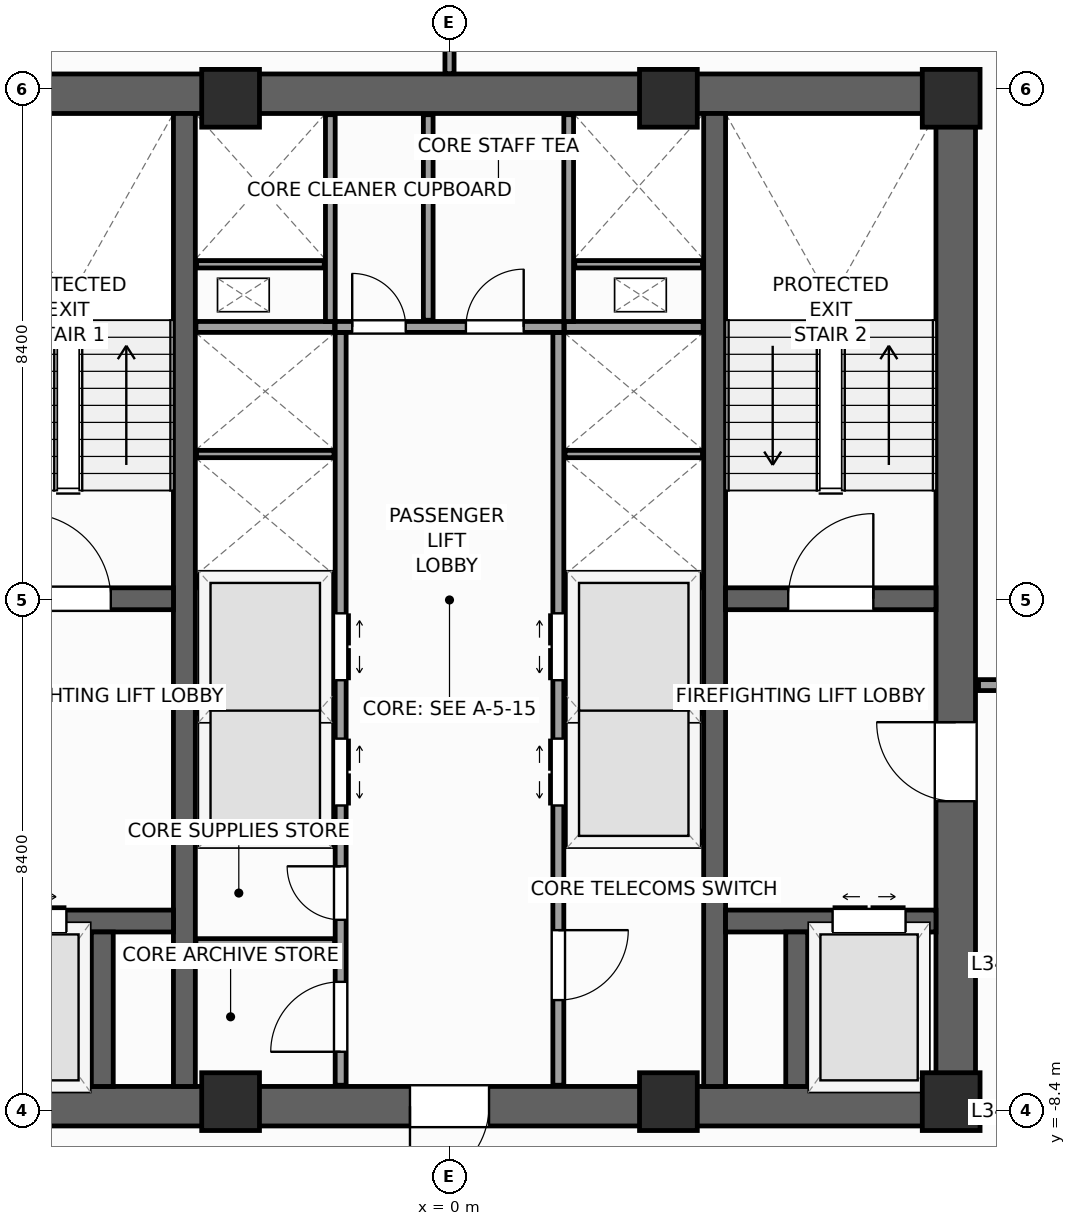
"""IFC4 building model, lengths in metres.
Left out: names, types, materials, properties, quantities, classifications, styles, units other than length and angle.
Written with IfcOpenShell. Run it as: python <this file> out.ifc"""

import sys

from ifc_helpers import new_model, si_unit, direction, frame, frame_2d, origin, origin_2d, place, context, subcontext, project, spatial, rectangle, extrude, source, transform, mapped, element, fill, save


model = new_model("IFC4")
c1 = context("Model", 3, precision=1e-05, world=origin(), true_north=direction((0.0, 1.0)))
c2 = subcontext(c1, "Body", "Model", "MODEL_VIEW")
j1 = project(units=[si_unit("LENGTHUNIT", "METRE"), si_unit("PLANEANGLEUNIT", "RADIAN")], contexts=[c1])
p1 = place(None, origin())
s1 = spatial("IfcSite", under=j1, at=p1, CompositionType="ELEMENT")
p2 = place(p1, origin())
s2 = spatial("IfcBuilding", under=s1, at=p2, CompositionType="ELEMENT")
p3 = place(p2, frame((0.0, 0.0, 144.4)))
s3 = spatial("IfcBuildingStorey", under=s2, at=p3, CompositionType="ELEMENT", Elevation=144.4)
p4 = place(p3, frame((-8.65, -8.325, 0.0), z_axis=(0.0, 0.0, 1.0), x_axis=(1.0, 0.0, 0.0)))
e1 = element("IfcWall", 1, at=p4, inside=s3, PredefinedType="SHEAR", context=c2, shape_type="SweptSolid", body=[
    extrude(rectangle(XDim=17.3, YDim=0.65, at=frame_2d((8.65, 0.0))), origin(), (0.0, 0.0, 1.0), 4.0),
])
p5 = place(p4, frame((8.0, 0.0, 0.0)))
e2 = element("IfcOpeningElement", 2, at=p5, cuts=e1, PredefinedType="OPENING", context=c2, shape_type="SweptSolid", body=[
    extrude(rectangle(XDim=1.3, YDim=2.2, at=frame_2d((0.65, 1.1))), frame((0.0, 0.335, 0.0), z_axis=(0.0, -1.0, 0.0), x_axis=(1.0, 0.0, 0.0)), (0.0, 0.0, 1.0), 0.67),
])
p6 = place(p3, frame((-8.65, 8.325, 0.0), z_axis=(0.0, 0.0, 1.0), x_axis=(1.0, 0.0, 0.0)))
e3 = element("IfcWall", 3, at=p6, inside=s3, PredefinedType="SHEAR", context=c2, shape_type="SweptSolid", body=[
    extrude(rectangle(XDim=17.3, YDim=0.65, at=frame_2d((8.65, 0.0))), origin(), (0.0, 0.0, 1.0), 4.0),
])
p7 = place(p3, frame((8.325, -8.0, 0.0), z_axis=(0.0, 0.0, 1.0), x_axis=(0.0, 1.0, 0.0)))
e4 = element("IfcWall", 4, at=p7, inside=s3, PredefinedType="SHEAR", context=c2, shape_type="SweptSolid", body=[
    extrude(rectangle(XDim=16.0, YDim=0.65, at=frame_2d((8.0, 0.0))), origin(), (0.0, 0.0, 1.0), 4.0),
])
p8 = place(p7, frame((4.69, 0.0, 0.0)))
e5 = element("IfcOpeningElement", 5, at=p8, cuts=e4, PredefinedType="OPENING", context=c2, shape_type="SweptSolid", body=[
    extrude(rectangle(XDim=1.3, YDim=2.2, at=frame_2d((0.65, 1.1))), frame((0.0, 0.335, 0.0), z_axis=(0.0, -1.0, 0.0), x_axis=(1.0, 0.0, 0.0)), (0.0, 0.0, 1.0), 0.67),
])
for number, where, z_axis, x_axis in (
    (6, (-4.36, -8.0, 0.0), (0.0, 0.0, 1.0), (0.0, 1.0, 0.0)),
    (7, (4.36, -8.0, 0.0), (0.0, 0.0, 1.0), (0.0, 1.0, 0.0)),
):
    element("IfcWall", number, at=place(p3, frame(where, z_axis=z_axis, x_axis=x_axis)), inside=s3, PredefinedType="SHEAR", context=c2, shape_type="SweptSolid", body=[
        extrude(rectangle(XDim=16.0, YDim=0.36, at=frame_2d((8.0, 0.0))), origin(), (0.0, 0.0, 1.0), 4.0),
    ])
p9 = place(p3, frame((-8.0, 0.02, 0.0), z_axis=(0.0, 0.0, 1.0), x_axis=(1.0, 0.0, 0.0)))
e8 = element("IfcWall", 8, at=p9, inside=s3, PredefinedType="SHEAR", context=c2, shape_type="SweptSolid", body=[
    extrude(rectangle(XDim=3.46, YDim=0.36, at=frame_2d((1.73, 0.0))), origin(), (0.0, 0.0, 1.0), 4.0),
])
p10 = place(p9, frame((1.03, 0.0, 0.0)))
e9 = element("IfcOpeningElement", 9, at=p10, cuts=e8, PredefinedType="OPENING", context=c2, shape_type="SweptSolid", body=[
    extrude(rectangle(XDim=1.4, YDim=2.2, at=frame_2d((0.7, 1.1))), frame((0.0, 0.19, 0.0), z_axis=(0.0, -1.0, 0.0), x_axis=(1.0, 0.0, 0.0)), (0.0, 0.0, 1.0), 0.38),
])
p11 = place(p3, frame((4.54, 0.02, 0.0), z_axis=(0.0, 0.0, 1.0), x_axis=(1.0, 0.0, 0.0)))
e10 = element("IfcWall", 10, at=p11, inside=s3, PredefinedType="SHEAR", context=c2, shape_type="SweptSolid", body=[
    extrude(rectangle(XDim=3.46, YDim=0.36, at=frame_2d((1.73, 0.0))), origin(), (0.0, 0.0, 1.0), 4.0),
])
p12 = place(p11, frame((1.03, 0.0, 0.0)))
e11 = element("IfcOpeningElement", 11, at=p12, cuts=e10, PredefinedType="OPENING", context=c2, shape_type="SweptSolid", body=[
    extrude(rectangle(XDim=1.4, YDim=2.2, at=frame_2d((0.7, 1.1))), frame((0.0, 0.19, 0.0), z_axis=(0.0, -1.0, 0.0), x_axis=(1.0, 0.0, 0.0)), (0.0, 0.0, 1.0), 0.38),
])
p13 = place(p3, frame((-8.0, -5.28, 0.0), z_axis=(0.0, 0.0, 1.0), x_axis=(1.0, 0.0, 0.0)))
e12 = element("IfcWall", 12, at=p13, inside=s3, PredefinedType="SHEAR", context=c2, shape_type="SweptSolid", body=[
    extrude(rectangle(XDim=3.46, YDim=0.36, at=frame_2d((1.73, 0.0))), origin(), (0.0, 0.0, 1.0), 4.0),
])
p14 = place(p13, frame((0.5, 0.0, 0.0)))
e13 = element("IfcOpeningElement", 13, at=p14, cuts=e12, PredefinedType="OPENING", context=c2, shape_type="SweptSolid", body=[
    extrude(rectangle(XDim=1.2, YDim=2.25, at=frame_2d((0.6, 1.125))), frame((0.0, 0.19, 0.0), z_axis=(0.0, -1.0, 0.0), x_axis=(1.0, 0.0, 0.0)), (0.0, 0.0, 1.0), 0.38),
])
p15 = place(p3, frame((4.54, -5.28, 0.0), z_axis=(0.0, 0.0, 1.0), x_axis=(1.0, 0.0, 0.0)))
e14 = element("IfcWall", 14, at=p15, inside=s3, PredefinedType="SHEAR", context=c2, shape_type="SweptSolid", body=[
    extrude(rectangle(XDim=3.46, YDim=0.36, at=frame_2d((1.73, 0.0))), origin(), (0.0, 0.0, 1.0), 4.0),
])
p16 = place(p15, frame((1.76, 0.0, 0.0)))
e15 = element("IfcOpeningElement", 15, at=p16, cuts=e14, PredefinedType="OPENING", context=c2, shape_type="SweptSolid", body=[
    extrude(rectangle(XDim=1.2, YDim=2.25, at=frame_2d((0.6, 1.125))), frame((0.0, 0.19, 0.0), z_axis=(0.0, -1.0, 0.0), x_axis=(1.0, 0.0, 0.0)), (0.0, 0.0, 1.0), 0.38),
])
for number, where, z_axis, x_axis in (
    (16, (-5.71, -8.0, 0.0), (0.0, 0.0, 1.0), (0.0, 1.0, 0.0)),
    (17, (5.71, -8.0, 0.0), (0.0, 0.0, 1.0), (0.0, 1.0, 0.0)),
):
    element("IfcWall", number, at=place(p3, frame(where, z_axis=z_axis, x_axis=x_axis)), inside=s3, PredefinedType="SHEAR", context=c2, shape_type="SweptSolid", body=[
        extrude(rectangle(XDim=2.54, YDim=0.36, at=frame_2d((1.27, 0.0))), origin(), (0.0, 0.0, 1.0), 4.0),
    ])
m1 = source(origin(), c2, "Body", "SweptSolid", [
    extrude(rectangle(XDim=0.95, YDim=0.95, at=origin_2d()), origin(), (0.0, 0.0, 1.0), 4.0),
])
for number, where, z_axis, x_axis in (
    (18, (8.25, -8.25, 0.0), (0.0, 0.0, 1.0), (1.0, 0.0, 0.0)),
    (19, (8.25, 8.25, 0.0), (0.0, 0.0, 1.0), (1.0, 0.0, 0.0)),
    (20, (-3.6, -8.25, 0.0), (0.0, 0.0, 1.0), (1.0, 0.0, 0.0)),
    (21, (3.6, -8.25, 0.0), (0.0, 0.0, 1.0), (1.0, 0.0, 0.0)),
    (22, (-3.6, 8.25, 0.0), (0.0, 0.0, 1.0), (1.0, 0.0, 0.0)),
    (23, (3.6, 8.25, 0.0), (0.0, 0.0, 1.0), (1.0, 0.0, 0.0)),
):
    element("IfcColumn", number, at=place(p3, frame(where, z_axis=z_axis, x_axis=x_axis)), inside=s3, PredefinedType="PILASTER", context=c2, shape_type="MappedRepresentation", body=[
        mapped(m1, transform((0.0, 0.0, 0.0), scale=1.0)),
    ])
p17 = place(p3, frame((-1.79, -7.98, 0.0), z_axis=(0.0, 0.0, 1.0), x_axis=(0.0, 1.0, 0.0)))
e24 = element("IfcWall", 24, at=p17, inside=s3, PredefinedType="PARTITIONING", context=c2, shape_type="SweptSolid", body=[
    extrude(rectangle(XDim=12.38, YDim=0.18, at=frame_2d((6.19, 0.0))), origin(), (0.0, 0.0, 1.0), 3.74),
])
p18 = place(p17, frame((4.6, 0.0, 0.0)))
e25 = element("IfcOpeningElement", 25, at=p18, cuts=e24, PredefinedType="OPENING", context=c2, shape_type="SweptSolid", body=[
    extrude(rectangle(XDim=1.1, YDim=2.2, at=frame_2d((0.55, 1.1))), frame((0.0, 0.1, 0.0), z_axis=(0.0, -1.0, 0.0), x_axis=(1.0, 0.0, 0.0)), (0.0, 0.0, 1.0), 0.2),
])
p19 = place(p17, frame((6.66, 0.0, 0.0)))
e26 = element("IfcOpeningElement", 26, at=p19, cuts=e24, PredefinedType="OPENING", context=c2, shape_type="SweptSolid", body=[
    extrude(rectangle(XDim=1.1, YDim=2.2, at=frame_2d((0.55, 1.1))), frame((0.0, 0.1, 0.0), z_axis=(0.0, -1.0, 0.0), x_axis=(1.0, 0.0, 0.0)), (0.0, 0.0, 1.0), 0.2),
])
p20 = place(p17, frame((0.55, 0.0, 0.0)))
e27 = element("IfcOpeningElement", 27, at=p20, cuts=e24, PredefinedType="OPENING", context=c2, shape_type="SweptSolid", body=[
    extrude(rectangle(XDim=1.15, YDim=2.25, at=frame_2d((0.575, 1.125))), frame((0.0, 0.1, 0.0), z_axis=(0.0, -1.0, 0.0), x_axis=(1.0, 0.0, 0.0)), (0.0, 0.0, 1.0), 0.2),
])
p21 = place(p17, frame((2.72, 0.0, 0.0)))
e28 = element("IfcOpeningElement", 28, at=p21, cuts=e24, PredefinedType="OPENING", context=c2, shape_type="SweptSolid", body=[
    extrude(rectangle(XDim=0.88, YDim=2.1, at=frame_2d((0.44, 1.05))), frame((0.0, 0.1, 0.0), z_axis=(0.0, -1.0, 0.0), x_axis=(1.0, 0.0, 0.0)), (0.0, 0.0, 1.0), 0.2),
])
p22 = place(p3, frame((1.79, -7.98, 0.0), z_axis=(0.0, 0.0, 1.0), x_axis=(0.0, 1.0, 0.0)))
e29 = element("IfcWall", 29, at=p22, inside=s3, PredefinedType="PARTITIONING", context=c2, shape_type="SweptSolid", body=[
    extrude(rectangle(XDim=12.38, YDim=0.18, at=frame_2d((6.19, 0.0))), origin(), (0.0, 0.0, 1.0), 3.74),
])
p23 = place(p22, frame((4.6, 0.0, 0.0)))
e30 = element("IfcOpeningElement", 30, at=p23, cuts=e29, PredefinedType="OPENING", context=c2, shape_type="SweptSolid", body=[
    extrude(rectangle(XDim=1.1, YDim=2.2, at=frame_2d((0.55, 1.1))), frame((0.0, 0.1, 0.0), z_axis=(0.0, -1.0, 0.0), x_axis=(1.0, 0.0, 0.0)), (0.0, 0.0, 1.0), 0.2),
])
p24 = place(p22, frame((6.66, 0.0, 0.0)))
e31 = element("IfcOpeningElement", 31, at=p24, cuts=e29, PredefinedType="OPENING", context=c2, shape_type="SweptSolid", body=[
    extrude(rectangle(XDim=1.1, YDim=2.2, at=frame_2d((0.55, 1.1))), frame((0.0, 0.1, 0.0), z_axis=(0.0, -1.0, 0.0), x_axis=(1.0, 0.0, 0.0)), (0.0, 0.0, 1.0), 0.2),
])
p25 = place(p22, frame((1.4, 0.0, 0.0)))
e32 = element("IfcOpeningElement", 32, at=p25, cuts=e29, PredefinedType="OPENING", context=c2, shape_type="SweptSolid", body=[
    extrude(rectangle(XDim=1.15, YDim=2.25, at=frame_2d((0.575, 1.125))), frame((0.0, 0.1, 0.0), z_axis=(0.0, -1.0, 0.0), x_axis=(1.0, 0.0, 0.0)), (0.0, 0.0, 1.0), 0.2),
])
p26 = place(p3, frame((-1.88, 4.49, 0.0), z_axis=(0.0, 0.0, 1.0), x_axis=(1.0, 0.0, 0.0)))
e33 = element("IfcWall", 33, at=p26, inside=s3, PredefinedType="PARTITIONING", context=c2, shape_type="SweptSolid", body=[
    extrude(rectangle(XDim=3.76, YDim=0.18, at=frame_2d((1.88, 0.0))), origin(), (0.0, 0.0, 1.0), 3.74),
])
p27 = place(p26, frame((0.28, 0.0, 0.0)))
e34 = element("IfcOpeningElement", 34, at=p27, cuts=e33, PredefinedType="OPENING", context=c2, shape_type="SweptSolid", body=[
    extrude(rectangle(XDim=0.88, YDim=2.1, at=frame_2d((0.44, 1.05))), frame((0.0, 0.1, 0.0), z_axis=(0.0, -1.0, 0.0), x_axis=(1.0, 0.0, 0.0)), (0.0, 0.0, 1.0), 0.2),
])
p28 = place(p26, frame((2.15, 0.0, 0.0)))
e35 = element("IfcOpeningElement", 35, at=p28, cuts=e33, PredefinedType="OPENING", context=c2, shape_type="SweptSolid", body=[
    extrude(rectangle(XDim=0.95, YDim=2.1, at=frame_2d((0.475, 1.05))), frame((0.0, 0.1, 0.0), z_axis=(0.0, -1.0, 0.0), x_axis=(1.0, 0.0, 0.0)), (0.0, 0.0, 1.0), 0.2),
])
for number, where, z_axis, x_axis in (
    (36, (-4.17, -3.9, 0.0), (0.0, 0.0, 1.0), (1.0, 0.0, 0.0)),
    (37, (1.89, -3.9, 0.0), (0.0, 0.0, 1.0), (1.0, 0.0, 0.0)),
    (38, (-4.17, 0.3, 0.0), (0.0, 0.0, 1.0), (1.0, 0.0, 0.0)),
    (39, (1.89, 0.3, 0.0), (0.0, 0.0, 1.0), (1.0, 0.0, 0.0)),
    (40, (-4.17, 4.49, 0.0), (0.0, 0.0, 1.0), (1.0, 0.0, 0.0)),
    (41, (1.89, 4.49, 0.0), (0.0, 0.0, 1.0), (1.0, 0.0, 0.0)),
):
    element("IfcWall", number, at=place(p3, frame(where, z_axis=z_axis, x_axis=x_axis)), inside=s3, PredefinedType="PARTITIONING", context=c2, shape_type="SweptSolid", body=[
        extrude(rectangle(XDim=2.28, YDim=0.18, at=frame_2d((1.14, 0.0))), origin(), (0.0, 0.0, 1.0), 3.74),
    ])
for number, where, z_axis, x_axis in (
    (42, (-4.16, -1.8, 0.0), (0.0, 0.0, 1.0), (1.0, 0.0, 0.0)),
    (43, (1.9, -1.8, 0.0), (0.0, 0.0, 1.0), (1.0, 0.0, 0.0)),
    (44, (-4.16, 2.4, 0.0), (0.0, 0.0, 1.0), (1.0, 0.0, 0.0)),
    (45, (1.9, 2.4, 0.0), (0.0, 0.0, 1.0), (1.0, 0.0, 0.0)),
):
    element("IfcWall", number, at=place(p3, frame(where, z_axis=z_axis, x_axis=x_axis)), inside=s3, PredefinedType="PARTITIONING", context=c2, shape_type="SweptSolid", body=[
        extrude(rectangle(XDim=2.26, YDim=0.12, at=frame_2d((1.13, 0.0))), origin(), (0.0, 0.0, 1.0), 3.74),
    ])
p29 = place(p3, frame((-4.17, -5.65, 0.0), z_axis=(0.0, 0.0, 1.0), x_axis=(1.0, 0.0, 0.0)))
e46 = element("IfcWall", 46, at=p29, inside=s3, PredefinedType="PARTITIONING", context=c2, shape_type="SweptSolid", body=[
    extrude(rectangle(XDim=2.28, YDim=0.16, at=frame_2d((1.14, 0.0))), origin(), (0.0, 0.0, 1.0), 3.74),
])
for number, where, z_axis, x_axis in (
    (47, (-1.96, 4.58, 0.0), (0.0, 0.0, 1.0), (0.0, 1.0, 0.0)),
    (48, (1.96, 4.58, 0.0), (0.0, 0.0, 1.0), (0.0, 1.0, 0.0)),
):
    element("IfcWall", number, at=place(p3, frame(where, z_axis=z_axis, x_axis=x_axis)), inside=s3, PredefinedType="PARTITIONING", context=c2, shape_type="SweptSolid", body=[
        extrude(rectangle(XDim=3.4, YDim=0.16, at=frame_2d((1.7, 0.0))), origin(), (0.0, 0.0, 1.0), 3.74),
    ])
for number, where, z_axis, x_axis in (
    (49, (-4.16, 5.52, 0.0), (0.0, 0.0, 1.0), (1.0, 0.0, 0.0)),
    (50, (2.06, 5.52, 0.0), (0.0, 0.0, 1.0), (1.0, 0.0, 0.0)),
):
    element("IfcWall", number, at=place(p3, frame(where, z_axis=z_axis, x_axis=x_axis)), inside=s3, PredefinedType="PARTITIONING", context=c2, shape_type="SweptSolid", body=[
        extrude(rectangle(XDim=2.1, YDim=0.12, at=frame_2d((1.05, 0.0))), origin(), (0.0, 0.0, 1.0), 3.74),
    ])
p30 = place(p3, frame((-0.35, 4.6, 0.0), z_axis=(0.0, 0.0, 1.0), x_axis=(0.0, 1.0, 0.0)))
e51 = element("IfcWall", 51, at=p30, inside=s3, PredefinedType="PARTITIONING", context=c2, shape_type="SweptSolid", body=[
    extrude(rectangle(XDim=3.38, YDim=0.16, at=frame_2d((1.69, 0.0))), origin(), (0.0, 0.0, 1.0), 3.74),
])
p31 = place(p3, frame((8.7, -1.4, 0.0), z_axis=(0.0, 0.0, 1.0), x_axis=(1.0, 0.0, 0.0)))
e52 = element("IfcWall", 52, at=p31, inside=s3, PredefinedType="PARTITIONING", context=c2, shape_type="SweptSolid", body=[
    extrude(rectangle(XDim=1.75, YDim=0.18, at=frame_2d((0.875, 0.0))), origin(), (0.0, 0.0, 1.0), 3.74),
])
p32 = place(p31, frame((0.325, 0.0, 0.0)))
e53 = element("IfcOpeningElement", 53, at=p32, cuts=e52, PredefinedType="OPENING", context=c2, shape_type="SweptSolid", body=[
    extrude(rectangle(XDim=1.1, YDim=2.2, at=frame_2d((0.55, 1.1))), frame((0.0, 0.1, 0.0), z_axis=(0.0, -1.0, 0.0), x_axis=(1.0, 0.0, 0.0)), (0.0, 0.0, 1.0), 0.2),
])
p33 = place(p3, frame((0.0, 8.655, 0.0), z_axis=(0.0, 0.0, 1.0), x_axis=(0.0, 1.0, 0.0)))
e54 = element("IfcWall", 54, at=p33, inside=s3, PredefinedType="PARTITIONING", context=c2, shape_type="SweptSolid", body=[
    extrude(rectangle(XDim=21.772, YDim=0.15, at=frame_2d((10.886, 0.0))), origin(), (0.0, 0.0, 1.0), 3.74),
])
m2 = source(origin(), c2, "Body", "SweptSolid", [
    extrude(rectangle(XDim=1.4, YDim=2.2, at=frame_2d((0.7, 1.1))), frame((0.0, 0.025, 0.0), z_axis=(0.0, -1.0, 0.0), x_axis=(1.0, 0.0, 0.0)), (0.0, 0.0, 1.0), 0.05),
])
p34 = place(p10, origin())
e55 = element("IfcDoor", 55, at=p34, inside=s3, OperationType="SINGLE_SWING_LEFT", PredefinedType="DOOR", context=c2, shape_type="MappedRepresentation", body=[
    mapped(m2, transform((0.0, 0.0, 0.0), scale=1.0)),
])
fill(e9, e55)
p35 = place(p12, origin())
e56 = element("IfcDoor", 56, at=p35, inside=s3, OperationType="SINGLE_SWING_RIGHT", PredefinedType="DOOR", context=c2, shape_type="MappedRepresentation", body=[
    mapped(m2, transform((0.0, 0.0, 0.0), scale=1.0)),
])
fill(e11, e56)
m3 = source(origin(), c2, "Body", "SweptSolid", [
    extrude(rectangle(XDim=1.3, YDim=2.2, at=frame_2d((0.65, 1.1))), frame((0.0, 0.025, 0.0), z_axis=(0.0, -1.0, 0.0), x_axis=(1.0, 0.0, 0.0)), (0.0, 0.0, 1.0), 0.05),
])
p36 = place(p8, origin())
e57 = element("IfcDoor", 57, at=p36, inside=s3, OperationType="SINGLE_SWING_RIGHT", PredefinedType="DOOR", context=c2, shape_type="MappedRepresentation", body=[
    mapped(m3, transform((0.0, 0.0, 0.0), scale=1.0)),
])
fill(e5, e57)
p37 = place(p5, frame((1.3, 0.0, 0.0), z_axis=(0.0, 0.0, 1.0), x_axis=(-1.0, 0.0, 0.0)))
e58 = element("IfcDoor", 58, at=p37, inside=s3, OperationType="SINGLE_SWING_LEFT", PredefinedType="DOOR", context=c2, shape_type="MappedRepresentation", body=[
    mapped(m3, transform((0.0, 0.0, 0.0), scale=1.0)),
])
fill(e2, e58)
m4 = source(origin(), c2, "Body", "SweptSolid", [
    extrude(rectangle(XDim=1.2, YDim=2.25, at=frame_2d((0.6, 1.125))), frame((0.0, 0.025, 0.0), z_axis=(0.0, -1.0, 0.0), x_axis=(1.0, 0.0, 0.0)), (0.0, 0.0, 1.0), 0.05),
])
p38 = place(p14, origin())
e59 = element("IfcDoor", 59, at=p38, inside=s3, OperationType="DOUBLE_DOOR_SLIDING", PredefinedType="DOOR", context=c2, shape_type="MappedRepresentation", body=[
    mapped(m4, transform((0.0, 0.0, 0.0), scale=1.0)),
])
fill(e13, e59)
p39 = place(p16, origin())
e60 = element("IfcDoor", 60, at=p39, inside=s3, OperationType="DOUBLE_DOOR_SLIDING", PredefinedType="DOOR", context=c2, shape_type="MappedRepresentation", body=[
    mapped(m4, transform((0.0, 0.0, 0.0), scale=1.0)),
])
fill(e15, e60)
m5 = source(origin(), c2, "Body", "SweptSolid", [
    extrude(rectangle(XDim=1.1, YDim=2.2, at=frame_2d((0.55, 1.1))), frame((0.0, 0.025, 0.0), z_axis=(0.0, -1.0, 0.0), x_axis=(1.0, 0.0, 0.0)), (0.0, 0.0, 1.0), 0.05),
])
p40 = place(p18, frame((1.1, 0.0, 0.0), z_axis=(0.0, 0.0, 1.0), x_axis=(-1.0, 0.0, 0.0)))
e61 = element("IfcDoor", 61, at=p40, inside=s3, OperationType="DOUBLE_DOOR_SLIDING", PredefinedType="DOOR", context=c2, shape_type="MappedRepresentation", body=[
    mapped(m5, transform((0.0, 0.0, 0.0), scale=1.0)),
])
fill(e25, e61)
p41 = place(p19, frame((1.1, 0.0, 0.0), z_axis=(0.0, 0.0, 1.0), x_axis=(-1.0, 0.0, 0.0)))
e62 = element("IfcDoor", 62, at=p41, inside=s3, OperationType="DOUBLE_DOOR_SLIDING", PredefinedType="DOOR", context=c2, shape_type="MappedRepresentation", body=[
    mapped(m5, transform((0.0, 0.0, 0.0), scale=1.0)),
])
fill(e26, e62)
p42 = place(p23, origin())
e63 = element("IfcDoor", 63, at=p42, inside=s3, OperationType="DOUBLE_DOOR_SLIDING", PredefinedType="DOOR", context=c2, shape_type="MappedRepresentation", body=[
    mapped(m5, transform((0.0, 0.0, 0.0), scale=1.0)),
])
fill(e30, e63)
p43 = place(p24, origin())
e64 = element("IfcDoor", 64, at=p43, inside=s3, OperationType="DOUBLE_DOOR_SLIDING", PredefinedType="DOOR", context=c2, shape_type="MappedRepresentation", body=[
    mapped(m5, transform((0.0, 0.0, 0.0), scale=1.0)),
])
fill(e31, e64)
m6 = source(origin(), c2, "Body", "SweptSolid", [
    extrude(rectangle(XDim=1.15, YDim=2.25, at=frame_2d((0.575, 1.125))), frame((0.0, 0.025, 0.0), z_axis=(0.0, -1.0, 0.0), x_axis=(1.0, 0.0, 0.0)), (0.0, 0.0, 1.0), 0.05),
])
p44 = place(p20, origin())
e65 = element("IfcDoor", 65, at=p44, inside=s3, OperationType="SINGLE_SWING_LEFT", PredefinedType="DOOR", context=c2, shape_type="MappedRepresentation", body=[
    mapped(m6, transform((0.0, 0.0, 0.0), scale=1.0)),
])
fill(e27, e65)
m7 = source(origin(), c2, "Body", "SweptSolid", [
    extrude(rectangle(XDim=0.88, YDim=2.1, at=frame_2d((0.44, 1.05))), frame((0.0, 0.025, 0.0), z_axis=(0.0, -1.0, 0.0), x_axis=(1.0, 0.0, 0.0)), (0.0, 0.0, 1.0), 0.05),
])
p45 = place(p21, origin())
e66 = element("IfcDoor", 66, at=p45, inside=s3, OperationType="SINGLE_SWING_RIGHT", PredefinedType="DOOR", context=c2, shape_type="MappedRepresentation", body=[
    mapped(m7, transform((0.0, 0.0, 0.0), scale=1.0)),
])
fill(e28, e66)
p46 = place(p25, frame((1.15, 0.0, 0.0), z_axis=(0.0, 0.0, 1.0), x_axis=(-1.0, 0.0, 0.0)))
e67 = element("IfcDoor", 67, at=p46, inside=s3, OperationType="SINGLE_SWING_RIGHT", PredefinedType="DOOR", context=c2, shape_type="MappedRepresentation", body=[
    mapped(m6, transform((0.0, 0.0, 0.0), scale=1.0)),
])
fill(e32, e67)
p47 = place(p27, origin())
e68 = element("IfcDoor", 68, at=p47, inside=s3, OperationType="SINGLE_SWING_LEFT", PredefinedType="DOOR", context=c2, shape_type="MappedRepresentation", body=[
    mapped(m7, transform((0.0, 0.0, 0.0), scale=1.0)),
])
fill(e34, e68)
m8 = source(origin(), c2, "Body", "SweptSolid", [
    extrude(rectangle(XDim=0.95, YDim=2.1, at=frame_2d((0.475, 1.05))), frame((0.0, 0.025, 0.0), z_axis=(0.0, -1.0, 0.0), x_axis=(1.0, 0.0, 0.0)), (0.0, 0.0, 1.0), 0.05),
])
p48 = place(p28, origin())
e69 = element("IfcDoor", 69, at=p48, inside=s3, OperationType="SINGLE_SWING_RIGHT", PredefinedType="DOOR", context=c2, shape_type="MappedRepresentation", body=[
    mapped(m8, transform((0.0, 0.0, 0.0), scale=1.0)),
])
fill(e35, e69)
save(model, sys.argv[1])
